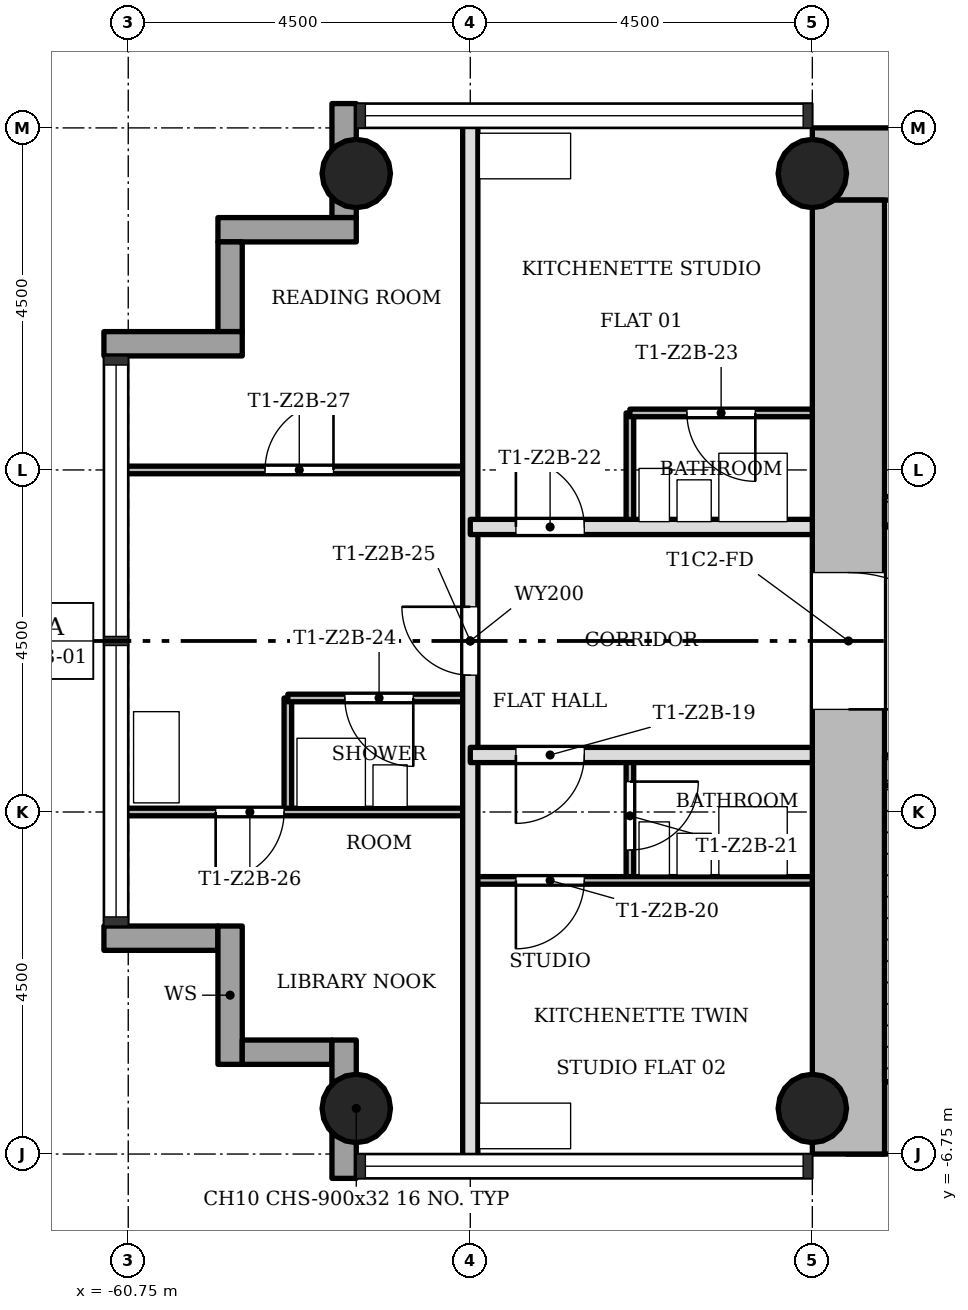
"""IFC4 building model, lengths in metres.
Left out: names, types, materials, properties, quantities, classifications, styles, units other than length and angle.
Written with IfcOpenShell. Run it as: python <this file> out.ifc"""

import sys

from ifc_helpers import new_model, si_unit, direction, frame, frame_2d, origin, origin_2d, place, context, subcontext, project, spatial, rectangle, hollow_circle, extrude, element, fill, save


model = new_model("IFC4")
c1 = context("Model", 3, precision=1e-05, world=origin(), true_north=direction((0.0, 1.0)))
c2 = subcontext(c1, "Body", "Model", "MODEL_VIEW")
j1 = project(units=[si_unit("LENGTHUNIT", "METRE"), si_unit("PLANEANGLEUNIT", "RADIAN")], contexts=[c1])
p1 = place(None, origin())
s1 = spatial("IfcSite", under=j1, at=p1, CompositionType="ELEMENT")
p2 = place(p1, origin())
s2 = spatial("IfcBuilding", under=s1, at=p2, CompositionType="ELEMENT")
p3 = place(p2, frame((0.0, 0.0, 83.4)))
s3 = spatial("IfcBuildingStorey", under=s2, at=p3, CompositionType="ELEMENT", Elevation=83.4)
p4 = place(p3, frame((-51.298, -6.275, 0.0), z_axis=(0.0, 0.0, 1.0), x_axis=(1.0, 0.0, 0.0)))
e1 = element("IfcWall", 1, at=p4, inside=s3, PredefinedType="SHEAR", context=c2, shape_type="SweptSolid", body=[
    extrude(rectangle(XDim=8.696, YDim=0.95, at=frame_2d((4.348, 0.0))), origin(), (0.0, 0.0, 1.0), 3.4),
])
p5 = place(p3, frame((-43.7, 6.275, 0.0), z_axis=(0.0, 0.0, 1.0), x_axis=(-1.0, 0.0, 0.0)))
e2 = element("IfcWall", 2, at=p5, inside=s3, PredefinedType="SHEAR", context=c2, shape_type="SweptSolid", body=[
    extrude(rectangle(XDim=8.05, YDim=0.95, at=frame_2d((4.025, 0.0))), origin(), (0.0, 0.0, 1.0), 3.4),
])
p6 = place(p3, frame((-51.275, 5.8, 0.0), z_axis=(0.0, 0.0, 1.0), x_axis=(0.0, -1.0, 0.0)))
e3 = element("IfcWall", 3, at=p6, inside=s3, PredefinedType="SHEAR", context=c2, shape_type="SweptSolid", body=[
    extrude(rectangle(XDim=12.55, YDim=0.95, at=frame_2d((6.275, 0.0))), origin(), (0.0, 0.0, 1.0), 3.4),
])
p7 = place(p6, frame((4.9, 0.0, 0.0)))
e4 = element("IfcOpeningElement", 4, at=p7, cuts=e3, PredefinedType="OPENING", context=c2, shape_type="SweptSolid", body=[
    extrude(rectangle(XDim=1.8, YDim=2.1, at=frame_2d((0.9, 1.05))), frame((0.0, 0.485, 0.0), z_axis=(0.0, -1.0, 0.0), x_axis=(1.0, 0.0, 0.0)), (0.0, 0.0, 1.0), 0.97),
])
p8 = place(p3, frame((-50.8, -1.7, 0.0), z_axis=(0.0, 0.0, 1.0), x_axis=(1.0, 0.0, 0.0)))
e5 = element("IfcWall", 5, at=p8, inside=s3, PredefinedType="SHEAR", context=c2, shape_type="SweptSolid", body=[
    extrude(rectangle(XDim=7.1, YDim=0.4, at=frame_2d((3.55, 0.0))), origin(), (0.0, 0.0, 1.0), 3.4),
])
p9 = place(p8, frame((5.5, 0.0, 0.0)))
e6 = element("IfcOpeningElement", 6, at=p9, cuts=e5, PredefinedType="OPENING", context=c2, shape_type="SweptSolid", body=[
    extrude(rectangle(XDim=0.9, YDim=2.1, at=frame_2d((0.45, 1.05))), frame((0.0, 0.21, 0.0), z_axis=(0.0, -1.0, 0.0), x_axis=(1.0, 0.0, 0.0)), (0.0, 0.0, 1.0), 0.42),
])
p10 = place(p3, frame((-50.8, 1.7, 0.0), z_axis=(0.0, 0.0, 1.0), x_axis=(1.0, 0.0, 0.0)))
e7 = element("IfcWall", 7, at=p10, inside=s3, PredefinedType="SHEAR", context=c2, shape_type="SweptSolid", body=[
    extrude(rectangle(XDim=7.1, YDim=0.4, at=frame_2d((3.55, 0.0))), origin(), (0.0, 0.0, 1.0), 3.4),
])
p11 = place(p10, frame((5.2, 0.0, 0.0)))
e8 = element("IfcOpeningElement", 8, at=p11, cuts=e7, PredefinedType="OPENING", context=c2, shape_type="SweptSolid", body=[
    extrude(rectangle(XDim=1.1, YDim=2.1, at=frame_2d((0.55, 1.05))), frame((0.0, 0.21, 0.0), z_axis=(0.0, -1.0, 0.0), x_axis=(1.0, 0.0, 0.0)), (0.0, 0.0, 1.0), 0.42),
])
for number, where, z_axis, x_axis in (
    (9, (-51.75, -6.15, 0.0), (0.0, 0.0, 1.0), (1.0, 0.0, 0.0)),
    (10, (-51.75, 6.15, 0.0), (0.0, 0.0, 1.0), (1.0, 0.0, 0.0)),
    (11, (-57.75, -6.15, 0.0), (0.0, 0.0, 1.0), (1.0, 0.0, 0.0)),
    (12, (-57.75, 6.15, 0.0), (0.0, 0.0, 1.0), (1.0, 0.0, 0.0)),
):
    element("IfcColumn", number, at=place(p3, frame(where, z_axis=z_axis, x_axis=x_axis)), inside=s3, PredefinedType="COLUMN", context=c2, shape_type="SweptSolid", body=[
        extrude(hollow_circle(Radius=0.45, WallThickness=0.032, at=origin_2d()), origin(), (0.0, 0.0, 1.0), 3.4),
    ])
p12 = place(p3, frame((-61.07, -3.91, -0.3), z_axis=(0.0, 0.0, 1.0), x_axis=(1.0, 0.0, 0.0)))
e13 = element("IfcWall", 13, at=p12, inside=s3, PredefinedType="STANDARD", context=c2, shape_type="SweptSolid", body=[
    extrude(rectangle(XDim=1.5, YDim=0.32, at=frame_2d((0.75, 0.0))), origin(), (0.0, 0.0, 1.0), 3.4),
])
p13 = place(p3, frame((-59.41, -3.75, -0.3), z_axis=(0.0, 0.0, 1.0), x_axis=(0.0, -1.0, 0.0)))
e14 = element("IfcWall", 14, at=p13, inside=s3, PredefinedType="STANDARD", context=c2, shape_type="SweptSolid", body=[
    extrude(rectangle(XDim=1.82, YDim=0.32, at=frame_2d((0.91, 0.0))), origin(), (0.0, 0.0, 1.0), 3.4),
])
p14 = place(p3, frame((-59.25, -5.41, -0.3), z_axis=(0.0, 0.0, 1.0), x_axis=(1.0, 0.0, 0.0)))
e15 = element("IfcWall", 15, at=p14, inside=s3, PredefinedType="STANDARD", context=c2, shape_type="SweptSolid", body=[
    extrude(rectangle(XDim=1.18, YDim=0.32, at=frame_2d((0.59, 0.0))), origin(), (0.0, 0.0, 1.0), 3.4),
])
p15 = place(p3, frame((-57.91, -5.25, -0.3), z_axis=(0.0, 0.0, 1.0), x_axis=(0.0, -1.0, 0.0)))
e16 = element("IfcWall", 16, at=p15, inside=s3, PredefinedType="STANDARD", context=c2, shape_type="SweptSolid", body=[
    extrude(rectangle(XDim=1.82, YDim=0.32, at=frame_2d((0.91, 0.0))), origin(), (0.0, 0.0, 1.0), 3.4),
])
p16 = place(p3, frame((-57.91, 7.07, -0.3), z_axis=(0.0, 0.0, 1.0), x_axis=(0.0, -1.0, 0.0)))
e17 = element("IfcWall", 17, at=p16, inside=s3, PredefinedType="STANDARD", context=c2, shape_type="SweptSolid", body=[
    extrude(rectangle(XDim=1.5, YDim=0.32, at=frame_2d((0.75, 0.0))), origin(), (0.0, 0.0, 1.0), 3.4),
])
p17 = place(p3, frame((-57.75, 5.41, -0.3), z_axis=(0.0, 0.0, 1.0), x_axis=(-1.0, 0.0, 0.0)))
e18 = element("IfcWall", 18, at=p17, inside=s3, PredefinedType="STANDARD", context=c2, shape_type="SweptSolid", body=[
    extrude(rectangle(XDim=1.82, YDim=0.32, at=frame_2d((0.91, 0.0))), origin(), (0.0, 0.0, 1.0), 3.4),
])
p18 = place(p3, frame((-59.41, 5.25, -0.3), z_axis=(0.0, 0.0, 1.0), x_axis=(0.0, -1.0, 0.0)))
e19 = element("IfcWall", 19, at=p18, inside=s3, PredefinedType="STANDARD", context=c2, shape_type="SweptSolid", body=[
    extrude(rectangle(XDim=1.18, YDim=0.32, at=frame_2d((0.59, 0.0))), origin(), (0.0, 0.0, 1.0), 3.4),
])
p19 = place(p3, frame((-59.25, 3.91, -0.3), z_axis=(0.0, 0.0, 1.0), x_axis=(-1.0, 0.0, 0.0)))
e20 = element("IfcWall", 20, at=p19, inside=s3, PredefinedType="STANDARD", context=c2, shape_type="SweptSolid", body=[
    extrude(rectangle(XDim=1.82, YDim=0.32, at=frame_2d((0.91, 0.0))), origin(), (0.0, 0.0, 1.0), 3.4),
])
p20 = place(p3, frame((-58.65, -2.25, 0.0), z_axis=(0.0, 0.0, 1.0), x_axis=(0.0, 1.0, 0.0)))
e21 = element("IfcWall", 21, at=p20, inside=s3, PredefinedType="PARTITIONING", context=c2, shape_type="SweptSolid", body=[
    extrude(rectangle(XDim=1.5, YDim=0.1, at=frame_2d((0.75, 0.0))), origin(), (0.0, 0.0, 1.0), 3.0),
])
p21 = place(p3, frame((-56.25, -6.85, 0.0), z_axis=(0.0, 0.0, 1.0), x_axis=(0.0, 1.0, 0.0)))
e22 = element("IfcWall", 22, at=p21, inside=s3, PredefinedType="SOLIDWALL", context=c2, shape_type="SweptSolid", body=[
    extrude(rectangle(XDim=13.7, YDim=0.2, at=frame_2d((6.85, 0.0))), origin(), (0.0, 0.0, 1.0), 3.0),
])
p22 = place(p21, frame((6.4, 0.0, 0.0)))
e23 = element("IfcOpeningElement", 23, at=p22, cuts=e22, PredefinedType="OPENING", context=c2, shape_type="SweptSolid", body=[
    extrude(rectangle(XDim=0.9, YDim=2.1, at=frame_2d((0.45, 1.05))), frame((0.0, 0.11, 0.0), z_axis=(0.0, -1.0, 0.0), x_axis=(1.0, 0.0, 0.0)), (0.0, 0.0, 1.0), 0.22),
])
p23 = place(p3, frame((-54.15, -3.15, 0.0), z_axis=(0.0, 0.0, 1.0), x_axis=(0.0, 1.0, 0.0)))
e24 = element("IfcWall", 24, at=p23, inside=s3, PredefinedType="PARTITIONING", context=c2, shape_type="SweptSolid", body=[
    extrude(rectangle(XDim=1.65, YDim=0.1, at=frame_2d((0.825, 0.0))), origin(), (0.0, 0.0, 1.0), 3.0),
])
p24 = place(p23, frame((0.4, 0.0, 0.0)))
e25 = element("IfcOpeningElement", 25, at=p24, cuts=e24, PredefinedType="OPENING", context=c2, shape_type="SweptSolid", body=[
    extrude(rectangle(XDim=0.9, YDim=2.1, at=frame_2d((0.45, 1.05))), frame((0.0, 0.06, 0.0), z_axis=(0.0, -1.0, 0.0), x_axis=(1.0, 0.0, 0.0)), (0.0, 0.0, 1.0), 0.12),
])
p25 = place(p3, frame((-54.15, 1.5, 0.0), z_axis=(0.0, 0.0, 1.0), x_axis=(0.0, 1.0, 0.0)))
e26 = element("IfcWall", 26, at=p25, inside=s3, PredefinedType="PARTITIONING", context=c2, shape_type="SweptSolid", body=[
    extrude(rectangle(XDim=1.5, YDim=0.1, at=frame_2d((0.75, 0.0))), origin(), (0.0, 0.0, 1.0), 3.0),
])
p26 = place(p3, frame((-56.25, -3.15, 0.0), z_axis=(0.0, 0.0, 1.0), x_axis=(1.0, 0.0, 0.0)))
e27 = element("IfcWall", 27, at=p26, inside=s3, PredefinedType="PARTITIONING", context=c2, shape_type="SweptSolid", body=[
    extrude(rectangle(XDim=4.5, YDim=0.1, at=frame_2d((2.25, 0.0))), origin(), (0.0, 0.0, 1.0), 3.0),
])
p27 = place(p26, frame((0.6, 0.0, 0.0)))
e28 = element("IfcOpeningElement", 28, at=p27, cuts=e27, PredefinedType="OPENING", context=c2, shape_type="SweptSolid", body=[
    extrude(rectangle(XDim=0.9, YDim=2.1, at=frame_2d((0.45, 1.05))), frame((0.0, 0.06, 0.0), z_axis=(0.0, -1.0, 0.0), x_axis=(1.0, 0.0, 0.0)), (0.0, 0.0, 1.0), 0.12),
])
p28 = place(p3, frame((-60.85, -2.25, 0.0), z_axis=(0.0, 0.0, 1.0), x_axis=(1.0, 0.0, 0.0)))
e29 = element("IfcWall", 29, at=p28, inside=s3, PredefinedType="PARTITIONING", context=c2, shape_type="SweptSolid", body=[
    extrude(rectangle(XDim=4.6, YDim=0.1, at=frame_2d((2.3, 0.0))), origin(), (0.0, 0.0, 1.0), 3.0),
])
p29 = place(p28, frame((1.25, 0.0, 0.0)))
e30 = element("IfcOpeningElement", 30, at=p29, cuts=e29, PredefinedType="OPENING", context=c2, shape_type="SweptSolid", body=[
    extrude(rectangle(XDim=0.9, YDim=2.1, at=frame_2d((0.45, 1.05))), frame((0.0, 0.06, 0.0), z_axis=(0.0, -1.0, 0.0), x_axis=(1.0, 0.0, 0.0)), (0.0, 0.0, 1.0), 0.12),
])
p30 = place(p3, frame((-56.25, -1.5, 0.0), z_axis=(0.0, 0.0, 1.0), x_axis=(1.0, 0.0, 0.0)))
e31 = element("IfcWall", 31, at=p30, inside=s3, PredefinedType="SOLIDWALL", context=c2, shape_type="SweptSolid", body=[
    extrude(rectangle(XDim=4.5, YDim=0.2, at=frame_2d((2.25, 0.0))), origin(), (0.0, 0.0, 1.0), 3.0),
])
p31 = place(p30, frame((0.6, 0.0, 0.0)))
e32 = element("IfcOpeningElement", 32, at=p31, cuts=e31, PredefinedType="OPENING", context=c2, shape_type="SweptSolid", body=[
    extrude(rectangle(XDim=0.9, YDim=2.1, at=frame_2d((0.45, 1.05))), frame((0.0, 0.11, 0.0), z_axis=(0.0, -1.0, 0.0), x_axis=(1.0, 0.0, 0.0)), (0.0, 0.0, 1.0), 0.22),
])
p32 = place(p3, frame((-58.65, -0.75, 0.0), z_axis=(0.0, 0.0, 1.0), x_axis=(1.0, 0.0, 0.0)))
e33 = element("IfcWall", 33, at=p32, inside=s3, PredefinedType="PARTITIONING", context=c2, shape_type="SweptSolid", body=[
    extrude(rectangle(XDim=2.4, YDim=0.1, at=frame_2d((1.2, 0.0))), origin(), (0.0, 0.0, 1.0), 3.0),
])
p33 = place(p32, frame((0.75, 0.0, 0.0)))
e34 = element("IfcOpeningElement", 34, at=p33, cuts=e33, PredefinedType="OPENING", context=c2, shape_type="SweptSolid", body=[
    extrude(rectangle(XDim=0.9, YDim=2.1, at=frame_2d((0.45, 1.05))), frame((0.0, 0.06, 0.0), z_axis=(0.0, -1.0, 0.0), x_axis=(1.0, 0.0, 0.0)), (0.0, 0.0, 1.0), 0.12),
])
p34 = place(p3, frame((-56.25, 1.5, 0.0), z_axis=(0.0, 0.0, 1.0), x_axis=(1.0, 0.0, 0.0)))
e35 = element("IfcWall", 35, at=p34, inside=s3, PredefinedType="SOLIDWALL", context=c2, shape_type="SweptSolid", body=[
    extrude(rectangle(XDim=4.5, YDim=0.2, at=frame_2d((2.25, 0.0))), origin(), (0.0, 0.0, 1.0), 3.0),
])
p35 = place(p34, frame((0.6, 0.0, 0.0)))
e36 = element("IfcOpeningElement", 36, at=p35, cuts=e35, PredefinedType="OPENING", context=c2, shape_type="SweptSolid", body=[
    extrude(rectangle(XDim=0.9, YDim=2.1, at=frame_2d((0.45, 1.05))), frame((0.0, 0.11, 0.0), z_axis=(0.0, -1.0, 0.0), x_axis=(1.0, 0.0, 0.0)), (0.0, 0.0, 1.0), 0.22),
])
p36 = place(p3, frame((-60.85, 2.25, 0.0), z_axis=(0.0, 0.0, 1.0), x_axis=(1.0, 0.0, 0.0)))
e37 = element("IfcWall", 37, at=p36, inside=s3, PredefinedType="PARTITIONING", context=c2, shape_type="SweptSolid", body=[
    extrude(rectangle(XDim=4.6, YDim=0.1, at=frame_2d((2.3, 0.0))), origin(), (0.0, 0.0, 1.0), 3.0),
])
p37 = place(p36, frame((1.9, 0.0, 0.0)))
e38 = element("IfcOpeningElement", 38, at=p37, cuts=e37, PredefinedType="OPENING", context=c2, shape_type="SweptSolid", body=[
    extrude(rectangle(XDim=0.9, YDim=2.1, at=frame_2d((0.45, 1.05))), frame((0.0, 0.06, 0.0), z_axis=(0.0, -1.0, 0.0), x_axis=(1.0, 0.0, 0.0)), (0.0, 0.0, 1.0), 0.12),
])
p38 = place(p3, frame((-54.15, 3.0, 0.0), z_axis=(0.0, 0.0, 1.0), x_axis=(1.0, 0.0, 0.0)))
e39 = element("IfcWall", 39, at=p38, inside=s3, PredefinedType="PARTITIONING", context=c2, shape_type="SweptSolid", body=[
    extrude(rectangle(XDim=2.4, YDim=0.1, at=frame_2d((1.2, 0.0))), origin(), (0.0, 0.0, 1.0), 3.0),
])
p39 = place(p38, frame((0.75, 0.0, 0.0)))
e40 = element("IfcOpeningElement", 40, at=p39, cuts=e39, PredefinedType="OPENING", context=c2, shape_type="SweptSolid", body=[
    extrude(rectangle(XDim=0.9, YDim=2.1, at=frame_2d((0.45, 1.05))), frame((0.0, 0.06, 0.0), z_axis=(0.0, -1.0, 0.0), x_axis=(1.0, 0.0, 0.0)), (0.0, 0.0, 1.0), 0.12),
])
p40 = place(p3, frame((-50.675, -1.9, 0.0), z_axis=(0.0, 0.0, 1.0), x_axis=(0.0, -1.0, 0.0)))
e41 = element("IfcWall", 41, at=p40, inside=s3, PredefinedType="SHEAR", context=c2, shape_type="SweptSolid", body=[
    extrude(rectangle(XDim=3.9, YDim=0.25, at=frame_2d((1.95, 0.0))), origin(), (0.0, 0.0, 1.0), 3.4),
])
p41 = place(p31, origin())
e42 = element("IfcDoor", 42, at=p41, inside=s3, OperationType="SINGLE_SWING_LEFT", PredefinedType="DOOR", context=c2, shape_type="SweptSolid", body=[
    extrude(rectangle(XDim=0.9, YDim=2.1, at=frame_2d((0.45, 1.05))), frame((0.0, 0.025, 0.0), z_axis=(0.0, -1.0, 0.0), x_axis=(1.0, 0.0, 0.0)), (0.0, 0.0, 1.0), 0.05),
])
fill(e32, e42)
p42 = place(p27, origin())
e43 = element("IfcDoor", 43, at=p42, inside=s3, OperationType="SINGLE_SWING_LEFT", PredefinedType="DOOR", context=c2, shape_type="SweptSolid", body=[
    extrude(rectangle(XDim=0.9, YDim=2.1, at=frame_2d((0.45, 1.05))), frame((0.0, 0.025, 0.0), z_axis=(0.0, -1.0, 0.0), x_axis=(1.0, 0.0, 0.0)), (0.0, 0.0, 1.0), 0.05),
])
fill(e28, e43)
p43 = place(p24, origin())
e44 = element("IfcDoor", 44, at=p43, inside=s3, OperationType="SINGLE_SWING_RIGHT", PredefinedType="DOOR", context=c2, shape_type="SweptSolid", body=[
    extrude(rectangle(XDim=0.9, YDim=2.1, at=frame_2d((0.45, 1.05))), frame((0.0, 0.025, 0.0), z_axis=(0.0, -1.0, 0.0), x_axis=(1.0, 0.0, 0.0)), (0.0, 0.0, 1.0), 0.05),
])
fill(e25, e44)
p44 = place(p35, origin())
e45 = element("IfcDoor", 45, at=p44, inside=s3, OperationType="SINGLE_SWING_RIGHT", PredefinedType="DOOR", context=c2, shape_type="SweptSolid", body=[
    extrude(rectangle(XDim=0.9, YDim=2.1, at=frame_2d((0.45, 1.05))), frame((0.0, 0.025, 0.0), z_axis=(0.0, -1.0, 0.0), x_axis=(1.0, 0.0, 0.0)), (0.0, 0.0, 1.0), 0.05),
])
fill(e36, e45)
p45 = place(p39, origin())
e46 = element("IfcDoor", 46, at=p45, inside=s3, OperationType="SINGLE_SWING_RIGHT", PredefinedType="DOOR", context=c2, shape_type="SweptSolid", body=[
    extrude(rectangle(XDim=0.9, YDim=2.1, at=frame_2d((0.45, 1.05))), frame((0.0, 0.025, 0.0), z_axis=(0.0, -1.0, 0.0), x_axis=(1.0, 0.0, 0.0)), (0.0, 0.0, 1.0), 0.05),
])
fill(e40, e46)
p46 = place(p33, origin())
e47 = element("IfcDoor", 47, at=p46, inside=s3, OperationType="SINGLE_SWING_RIGHT", PredefinedType="DOOR", context=c2, shape_type="SweptSolid", body=[
    extrude(rectangle(XDim=0.9, YDim=2.1, at=frame_2d((0.45, 1.05))), frame((0.0, 0.025, 0.0), z_axis=(0.0, -1.0, 0.0), x_axis=(1.0, 0.0, 0.0)), (0.0, 0.0, 1.0), 0.05),
])
fill(e34, e47)
p47 = place(p22, origin())
e48 = element("IfcDoor", 48, at=p47, inside=s3, OperationType="SINGLE_SWING_LEFT", PredefinedType="DOOR", context=c2, shape_type="SweptSolid", body=[
    extrude(rectangle(XDim=0.9, YDim=2.1, at=frame_2d((0.45, 1.05))), frame((0.0, 0.025, 0.0), z_axis=(0.0, -1.0, 0.0), x_axis=(1.0, 0.0, 0.0)), (0.0, 0.0, 1.0), 0.05),
])
fill(e23, e48)
p48 = place(p29, origin())
e49 = element("IfcDoor", 49, at=p48, inside=s3, OperationType="SINGLE_SWING_LEFT", PredefinedType="DOOR", context=c2, shape_type="SweptSolid", body=[
    extrude(rectangle(XDim=0.9, YDim=2.1, at=frame_2d((0.45, 1.05))), frame((0.0, 0.025, 0.0), z_axis=(0.0, -1.0, 0.0), x_axis=(1.0, 0.0, 0.0)), (0.0, 0.0, 1.0), 0.05),
])
fill(e30, e49)
p49 = place(p37, origin())
e50 = element("IfcDoor", 50, at=p49, inside=s3, OperationType="SINGLE_SWING_LEFT", PredefinedType="DOOR", context=c2, shape_type="SweptSolid", body=[
    extrude(rectangle(XDim=0.9, YDim=2.1, at=frame_2d((0.45, 1.05))), frame((0.0, 0.025, 0.0), z_axis=(0.0, -1.0, 0.0), x_axis=(1.0, 0.0, 0.0)), (0.0, 0.0, 1.0), 0.05),
])
fill(e38, e50)
p50 = place(p7, origin())
e51 = element("IfcDoor", 51, at=p50, inside=s3, OperationType="SINGLE_SWING_LEFT", PredefinedType="DOOR", context=c2, shape_type="SweptSolid", body=[
    extrude(rectangle(XDim=1.8, YDim=2.1, at=frame_2d((0.9, 1.05))), frame((0.0, 0.025, 0.0), z_axis=(0.0, -1.0, 0.0), x_axis=(1.0, 0.0, 0.0)), (0.0, 0.0, 1.0), 0.05),
])
fill(e4, e51)
save(model, sys.argv[1])
